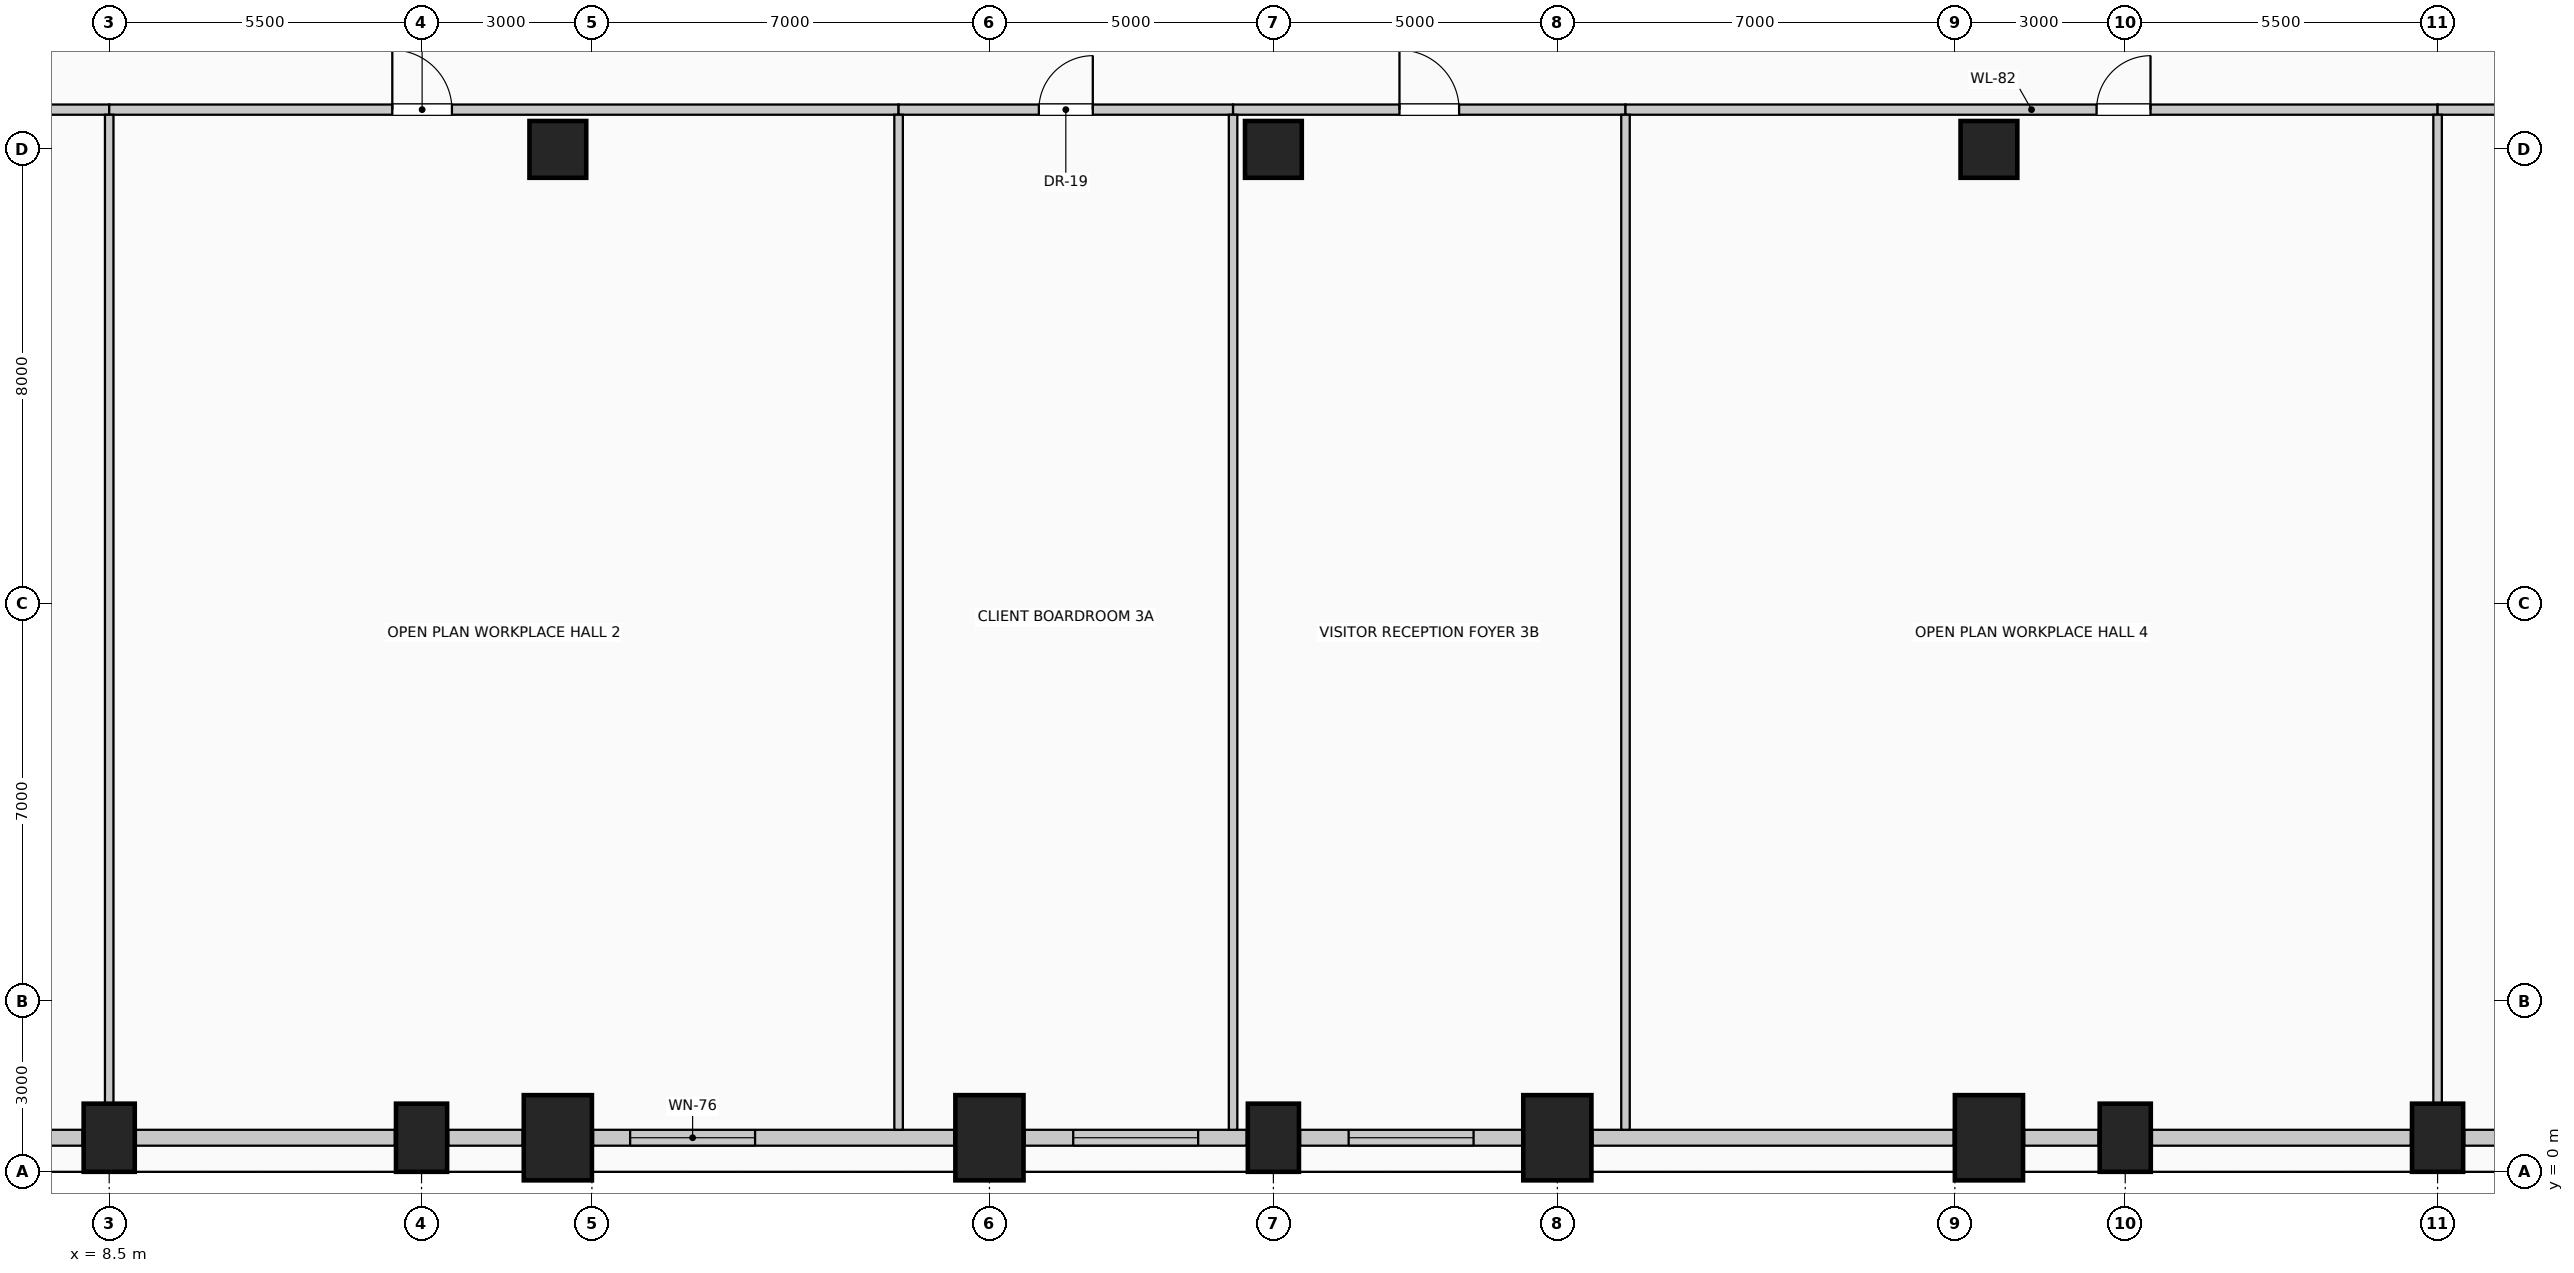
"""IFC4 building model, lengths in metres.
Left out: names, types, materials, properties, quantities, classifications, styles, units other than length and angle.
Written with IfcOpenShell. Run it as: python <this file> out.ifc"""

import sys

from ifc_helpers import new_model, si_unit, direction, frame, frame_2d, origin, origin_2d, place, context, subcontext, project, spatial, rectangle, circle, extrude, element, fill, save


model = new_model("IFC4")
c1 = context("Model", 3, precision=1e-05, world=origin(), true_north=direction((0.0, 1.0)))
c2 = subcontext(c1, "Body", "Model", "MODEL_VIEW")
j1 = project(units=[si_unit("LENGTHUNIT", "METRE"), si_unit("PLANEANGLEUNIT", "RADIAN")], contexts=[c1])
p1 = place(None, origin())
s1 = spatial("IfcSite", under=j1, at=p1, CompositionType="ELEMENT")
p2 = place(p1, origin())
s2 = spatial("IfcBuilding", under=s1, at=p2, CompositionType="ELEMENT")
p3 = place(p2, frame((0.0, 0.0, 66.6)))
s3 = spatial("IfcBuildingStorey", under=s2, at=p3, CompositionType="ELEMENT", Elevation=66.6)
for number, where, z_axis, x_axis in (
    (1, (8.5, 0.6, 0.0), (0.0, 0.0, 1.0), (1.0, 0.0, 0.0)),
    (2, (14.0, 0.6, 0.0), (0.0, 0.0, 1.0), (1.0, 0.0, 0.0)),
):
    element("IfcColumn", number, at=place(p3, frame(where, z_axis=z_axis, x_axis=x_axis)), inside=s3, PredefinedType="COLUMN", context=c2, shape_type="SweptSolid", body=[
        extrude(rectangle(XDim=0.9, YDim=1.2, at=origin_2d()), origin(), (0.0, 0.0, 1.0), 4.0),
    ])
for number, where, z_axis, x_axis in (
    (3, (16.4, 0.6, 0.0), (0.0, 0.0, 1.0), (1.0, 0.0, 0.0)),
    (4, (24.0, 0.6, 0.0), (0.0, 0.0, 1.0), (1.0, 0.0, 0.0)),
):
    element("IfcColumn", number, at=place(p3, frame(where, z_axis=z_axis, x_axis=x_axis)), inside=s3, PredefinedType="COLUMN", context=c2, shape_type="SweptSolid", body=[
        extrude(rectangle(XDim=1.2, YDim=1.5, at=origin_2d()), origin(), (0.0, 0.0, 1.0), 4.0),
    ])
p4 = place(p3, frame((29.0, 0.6, 0.0), z_axis=(0.0, 0.0, 1.0), x_axis=(1.0, 0.0, 0.0)))
e5 = element("IfcColumn", 5, at=p4, inside=s3, PredefinedType="COLUMN", context=c2, shape_type="SweptSolid", body=[
    extrude(rectangle(XDim=0.9, YDim=1.2, at=origin_2d()), origin(), (0.0, 0.0, 1.0), 4.0),
])
for number, where, z_axis, x_axis in (
    (6, (34.0, 0.6, 0.0), (0.0, 0.0, 1.0), (1.0, 0.0, 0.0)),
    (7, (41.6, 0.6, 0.0), (0.0, 0.0, 1.0), (1.0, 0.0, 0.0)),
):
    element("IfcColumn", number, at=place(p3, frame(where, z_axis=z_axis, x_axis=x_axis)), inside=s3, PredefinedType="COLUMN", context=c2, shape_type="SweptSolid", body=[
        extrude(rectangle(XDim=1.2, YDim=1.5, at=origin_2d()), origin(), (0.0, 0.0, 1.0), 4.0),
    ])
for number, where, z_axis, x_axis in (
    (8, (44.0, 0.6, 0.0), (0.0, 0.0, 1.0), (1.0, 0.0, 0.0)),
    (9, (49.5, 0.6, 0.0), (0.0, 0.0, 1.0), (1.0, 0.0, 0.0)),
):
    element("IfcColumn", number, at=place(p3, frame(where, z_axis=z_axis, x_axis=x_axis)), inside=s3, PredefinedType="COLUMN", context=c2, shape_type="SweptSolid", body=[
        extrude(rectangle(XDim=0.9, YDim=1.2, at=origin_2d()), origin(), (0.0, 0.0, 1.0), 4.0),
    ])
for number, where, z_axis, x_axis in (
    (10, (16.4, 18.0, 0.0), (0.0, 0.0, 1.0), (1.0, 0.0, 0.0)),
    (11, (29.0, 18.0, 0.0), (0.0, 0.0, 1.0), (1.0, 0.0, 0.0)),
    (12, (41.6, 18.0, 0.0), (0.0, 0.0, 1.0), (1.0, 0.0, 0.0)),
):
    element("IfcColumn", number, at=place(p3, frame(where, z_axis=z_axis, x_axis=x_axis)), inside=s3, PredefinedType="COLUMN", context=c2, shape_type="SweptSolid", body=[
        extrude(circle(Radius=0.5, at=origin_2d()), origin(), (0.0, 0.0, 1.0), 4.0),
    ])
p5 = place(p3, frame((8.03, 0.6, 0.0), z_axis=(0.0, 0.0, 1.0), x_axis=(-1.0, 0.0, 0.0)))
e13 = element("IfcWall", 13, at=p5, inside=s3, PredefinedType="SOLIDWALL", context=c2, shape_type="SweptSolid", body=[
    extrude(rectangle(XDim=3.96, YDim=0.28, at=frame_2d((1.98, 0.0))), origin(), (0.0, 0.0, 1.0), 2.85),
])
p6 = place(p3, frame((13.53, 0.6, 0.0), z_axis=(0.0, 0.0, 1.0), x_axis=(-1.0, 0.0, 0.0)))
e14 = element("IfcWall", 14, at=p6, inside=s3, PredefinedType="SOLIDWALL", context=c2, shape_type="SweptSolid", body=[
    extrude(rectangle(XDim=4.56, YDim=0.28, at=frame_2d((2.28, 0.0))), origin(), (0.0, 0.0, 1.0), 2.85),
])
p7 = place(p3, frame((15.78, 0.6, 0.0), z_axis=(0.0, 0.0, 1.0), x_axis=(-1.0, 0.0, 0.0)))
e15 = element("IfcWall", 15, at=p7, inside=s3, PredefinedType="SOLIDWALL", context=c2, shape_type="SweptSolid", body=[
    extrude(rectangle(XDim=1.31, YDim=0.28, at=frame_2d((0.655, 0.0))), origin(), (0.0, 0.0, 1.0), 2.85),
])
p8 = place(p3, frame((23.38, 0.6, 0.0), z_axis=(0.0, 0.0, 1.0), x_axis=(-1.0, 0.0, 0.0)))
e16 = element("IfcWall", 16, at=p8, inside=s3, PredefinedType="SOLIDWALL", context=c2, shape_type="SweptSolid", body=[
    extrude(rectangle(XDim=6.36, YDim=0.28, at=frame_2d((3.18, 0.0))), origin(), (0.0, 0.0, 1.0), 2.85),
])
p9 = place(p8, frame((3.507, 0.0, 0.5)))
e17 = element("IfcOpeningElement", 17, at=p9, cuts=e16, PredefinedType="OPENING", context=c2, shape_type="SweptSolid", body=[
    extrude(rectangle(XDim=2.2, YDim=1.95, at=frame_2d((1.1, 0.975))), frame((0.0, 0.15, 0.0), z_axis=(0.0, -1.0, 0.0), x_axis=(1.0, 0.0, 0.0)), (0.0, 0.0, 1.0), 0.3),
])
p10 = place(p3, frame((28.53, 0.6, 0.0), z_axis=(0.0, 0.0, 1.0), x_axis=(-1.0, 0.0, 0.0)))
e18 = element("IfcWall", 18, at=p10, inside=s3, PredefinedType="SOLIDWALL", context=c2, shape_type="SweptSolid", body=[
    extrude(rectangle(XDim=3.91, YDim=0.28, at=frame_2d((1.955, 0.0))), origin(), (0.0, 0.0, 1.0), 2.85),
])
p11 = place(p10, frame((0.855, 0.0, 0.5)))
e19 = element("IfcOpeningElement", 19, at=p11, cuts=e18, PredefinedType="OPENING", context=c2, shape_type="SweptSolid", body=[
    extrude(rectangle(XDim=2.2, YDim=1.95, at=frame_2d((1.1, 0.975))), frame((0.0, 0.15, 0.0), z_axis=(0.0, -1.0, 0.0), x_axis=(1.0, 0.0, 0.0)), (0.0, 0.0, 1.0), 0.3),
])
p12 = place(p3, frame((33.38, 0.6, 0.0), z_axis=(0.0, 0.0, 1.0), x_axis=(-1.0, 0.0, 0.0)))
e20 = element("IfcWall", 20, at=p12, inside=s3, PredefinedType="SOLIDWALL", context=c2, shape_type="SweptSolid", body=[
    extrude(rectangle(XDim=3.91, YDim=0.28, at=frame_2d((1.955, 0.0))), origin(), (0.0, 0.0, 1.0), 2.85),
])
p13 = place(p12, frame((0.855, 0.0, 0.5)))
e21 = element("IfcOpeningElement", 21, at=p13, cuts=e20, PredefinedType="OPENING", context=c2, shape_type="SweptSolid", body=[
    extrude(rectangle(XDim=2.2, YDim=1.95, at=frame_2d((1.1, 0.975))), frame((0.0, 0.15, 0.0), z_axis=(0.0, -1.0, 0.0), x_axis=(1.0, 0.0, 0.0)), (0.0, 0.0, 1.0), 0.3),
])
p14 = place(p3, frame((40.98, 0.6, 0.0), z_axis=(0.0, 0.0, 1.0), x_axis=(-1.0, 0.0, 0.0)))
e22 = element("IfcWall", 22, at=p14, inside=s3, PredefinedType="SOLIDWALL", context=c2, shape_type="SweptSolid", body=[
    extrude(rectangle(XDim=6.36, YDim=0.28, at=frame_2d((3.18, 0.0))), origin(), (0.0, 0.0, 1.0), 2.85),
])
p15 = place(p3, frame((43.53, 0.6, 0.0), z_axis=(0.0, 0.0, 1.0), x_axis=(-1.0, 0.0, 0.0)))
e23 = element("IfcWall", 23, at=p15, inside=s3, PredefinedType="SOLIDWALL", context=c2, shape_type="SweptSolid", body=[
    extrude(rectangle(XDim=1.31, YDim=0.28, at=frame_2d((0.655, 0.0))), origin(), (0.0, 0.0, 1.0), 2.85),
])
p16 = place(p3, frame((49.03, 0.6, 0.0), z_axis=(0.0, 0.0, 1.0), x_axis=(-1.0, 0.0, 0.0)))
e24 = element("IfcWall", 24, at=p16, inside=s3, PredefinedType="SOLIDWALL", context=c2, shape_type="SweptSolid", body=[
    extrude(rectangle(XDim=4.56, YDim=0.28, at=frame_2d((2.28, 0.0))), origin(), (0.0, 0.0, 1.0), 2.85),
])
p17 = place(p3, frame((53.93, 0.6, 0.0), z_axis=(0.0, 0.0, 1.0), x_axis=(-1.0, 0.0, 0.0)))
e25 = element("IfcWall", 25, at=p17, inside=s3, PredefinedType="SOLIDWALL", context=c2, shape_type="SweptSolid", body=[
    extrude(rectangle(XDim=3.96, YDim=0.28, at=frame_2d((1.98, 0.0))), origin(), (0.0, 0.0, 1.0), 2.85),
])
p18 = place(p3, frame((0.74, 18.7, 0.0), z_axis=(0.0, 0.0, 1.0), x_axis=(1.0, 0.0, 0.0)))
e26 = element("IfcWall", 26, at=p18, inside=s3, PredefinedType="PARTITIONING", context=c2, shape_type="SweptSolid", body=[
    extrude(rectangle(XDim=7.76, YDim=0.18, at=frame_2d((3.88, 0.0))), origin(), (0.0, 0.0, 1.0), 3.7),
])
p19 = place(p18, frame((3.405, 0.0, 0.0)))
e27 = element("IfcOpeningElement", 27, at=p19, cuts=e26, PredefinedType="OPENING", context=c2, shape_type="SweptSolid", body=[
    extrude(rectangle(XDim=0.95, YDim=2.15, at=frame_2d((0.475, 1.075))), frame((0.0, 0.1, 0.0), z_axis=(0.0, -1.0, 0.0), x_axis=(1.0, 0.0, 0.0)), (0.0, 0.0, 1.0), 0.2),
])
p20 = place(p3, frame((8.5, 18.7, 0.0), z_axis=(0.0, 0.0, 1.0), x_axis=(1.0, 0.0, 0.0)))
e28 = element("IfcWall", 28, at=p20, inside=s3, PredefinedType="PARTITIONING", context=c2, shape_type="SweptSolid", body=[
    extrude(rectangle(XDim=13.9, YDim=0.18, at=frame_2d((6.95, 0.0))), origin(), (0.0, 0.0, 1.0), 3.7),
])
p21 = place(p20, frame((4.985, 0.0, 0.0)))
e29 = element("IfcOpeningElement", 29, at=p21, cuts=e28, PredefinedType="OPENING", context=c2, shape_type="SweptSolid", body=[
    extrude(rectangle(XDim=1.05, YDim=2.15, at=frame_2d((0.525, 1.075))), frame((0.0, 0.1, 0.0), z_axis=(0.0, -1.0, 0.0), x_axis=(1.0, 0.0, 0.0)), (0.0, 0.0, 1.0), 0.2),
])
p22 = place(p3, frame((22.4, 18.7, 0.0), z_axis=(0.0, 0.0, 1.0), x_axis=(1.0, 0.0, 0.0)))
e30 = element("IfcWall", 30, at=p22, inside=s3, PredefinedType="PARTITIONING", context=c2, shape_type="SweptSolid", body=[
    extrude(rectangle(XDim=5.89, YDim=0.18, at=frame_2d((2.945, 0.0))), origin(), (0.0, 0.0, 1.0), 3.7),
])
p23 = place(p22, frame((2.47, 0.0, 0.0)))
e31 = element("IfcOpeningElement", 31, at=p23, cuts=e30, PredefinedType="OPENING", context=c2, shape_type="SweptSolid", body=[
    extrude(rectangle(XDim=0.95, YDim=2.15, at=frame_2d((0.475, 1.075))), frame((0.0, 0.1, 0.0), z_axis=(0.0, -1.0, 0.0), x_axis=(1.0, 0.0, 0.0)), (0.0, 0.0, 1.0), 0.2),
])
p24 = place(p3, frame((28.29, 18.7, 0.0), z_axis=(0.0, 0.0, 1.0), x_axis=(1.0, 0.0, 0.0)))
e32 = element("IfcWall", 32, at=p24, inside=s3, PredefinedType="PARTITIONING", context=c2, shape_type="SweptSolid", body=[
    extrude(rectangle(XDim=6.91, YDim=0.18, at=frame_2d((3.455, 0.0))), origin(), (0.0, 0.0, 1.0), 3.7),
])
p25 = place(p24, frame((2.93, 0.0, 0.0)))
e33 = element("IfcOpeningElement", 33, at=p25, cuts=e32, PredefinedType="OPENING", context=c2, shape_type="SweptSolid", body=[
    extrude(rectangle(XDim=1.05, YDim=2.15, at=frame_2d((0.525, 1.075))), frame((0.0, 0.1, 0.0), z_axis=(0.0, -1.0, 0.0), x_axis=(1.0, 0.0, 0.0)), (0.0, 0.0, 1.0), 0.2),
])
p26 = place(p3, frame((35.2, 18.7, 0.0), z_axis=(0.0, 0.0, 1.0), x_axis=(1.0, 0.0, 0.0)))
e34 = element("IfcWall", 34, at=p26, inside=s3, PredefinedType="PARTITIONING", context=c2, shape_type="SweptSolid", body=[
    extrude(rectangle(XDim=14.3, YDim=0.18, at=frame_2d((7.15, 0.0))), origin(), (0.0, 0.0, 1.0), 3.7),
])
p27 = place(p26, frame((8.295, 0.0, 0.0)))
e35 = element("IfcOpeningElement", 35, at=p27, cuts=e34, PredefinedType="OPENING", context=c2, shape_type="SweptSolid", body=[
    extrude(rectangle(XDim=0.95, YDim=2.15, at=frame_2d((0.475, 1.075))), frame((0.0, 0.1, 0.0), z_axis=(0.0, -1.0, 0.0), x_axis=(1.0, 0.0, 0.0)), (0.0, 0.0, 1.0), 0.2),
])
p28 = place(p3, frame((49.5, 18.7, 0.0), z_axis=(0.0, 0.0, 1.0), x_axis=(1.0, 0.0, 0.0)))
e36 = element("IfcWall", 36, at=p28, inside=s3, PredefinedType="PARTITIONING", context=c2, shape_type="SweptSolid", body=[
    extrude(rectangle(XDim=7.76, YDim=0.18, at=frame_2d((3.88, 0.0))), origin(), (0.0, 0.0, 1.0), 3.7),
])
p29 = place(p28, frame((3.355, 0.0, 0.0)))
e37 = element("IfcOpeningElement", 37, at=p29, cuts=e36, PredefinedType="OPENING", context=c2, shape_type="SweptSolid", body=[
    extrude(rectangle(XDim=1.05, YDim=2.15, at=frame_2d((0.525, 1.075))), frame((0.0, 0.1, 0.0), z_axis=(0.0, -1.0, 0.0), x_axis=(1.0, 0.0, 0.0)), (0.0, 0.0, 1.0), 0.2),
])
p30 = place(p3, frame((8.5, 1.2, 0.0), z_axis=(0.0, 0.0, 1.0), x_axis=(0.0, 1.0, 0.0)))
e38 = element("IfcWall", 38, at=p30, inside=s3, PredefinedType="PARTITIONING", context=c2, shape_type="SweptSolid", body=[
    extrude(rectangle(XDim=17.41, YDim=0.15, at=frame_2d((8.705, 0.0))), origin(), (0.0, 0.0, 1.0), 3.7),
])
for number, where, z_axis, x_axis in (
    (39, (22.4, 0.74, 0.0), (0.0, 0.0, 1.0), (0.0, 1.0, 0.0)),
    (40, (28.29, 0.74, 0.0), (0.0, 0.0, 1.0), (0.0, 1.0, 0.0)),
    (41, (35.2, 0.74, 0.0), (0.0, 0.0, 1.0), (0.0, 1.0, 0.0)),
):
    element("IfcWall", number, at=place(p3, frame(where, z_axis=z_axis, x_axis=x_axis)), inside=s3, PredefinedType="PARTITIONING", context=c2, shape_type="SweptSolid", body=[
        extrude(rectangle(XDim=17.87, YDim=0.15, at=frame_2d((8.935, 0.0))), origin(), (0.0, 0.0, 1.0), 3.7),
    ])
p31 = place(p3, frame((49.5, 1.2, 0.0), z_axis=(0.0, 0.0, 1.0), x_axis=(0.0, 1.0, 0.0)))
e42 = element("IfcWall", 42, at=p31, inside=s3, PredefinedType="PARTITIONING", context=c2, shape_type="SweptSolid", body=[
    extrude(rectangle(XDim=17.41, YDim=0.15, at=frame_2d((8.705, 0.0))), origin(), (0.0, 0.0, 1.0), 3.7),
])
p32 = place(p9, origin())
e43 = element("IfcWindow", 43, at=p32, inside=s3, PartitioningType="SINGLE_PANEL", PredefinedType="WINDOW", context=c2, shape_type="SweptSolid", body=[
    extrude(rectangle(XDim=2.2, YDim=1.95, at=frame_2d((1.1, 0.975))), frame((0.0, 0.03, 0.0), z_axis=(0.0, -1.0, 0.0), x_axis=(1.0, 0.0, 0.0)), (0.0, 0.0, 1.0), 0.06),
])
fill(e17, e43)
p33 = place(p11, origin())
e44 = element("IfcWindow", 44, at=p33, inside=s3, PartitioningType="SINGLE_PANEL", PredefinedType="WINDOW", context=c2, shape_type="SweptSolid", body=[
    extrude(rectangle(XDim=2.2, YDim=1.95, at=frame_2d((1.1, 0.975))), frame((0.0, 0.03, 0.0), z_axis=(0.0, -1.0, 0.0), x_axis=(1.0, 0.0, 0.0)), (0.0, 0.0, 1.0), 0.06),
])
fill(e19, e44)
p34 = place(p13, origin())
e45 = element("IfcWindow", 45, at=p34, inside=s3, PartitioningType="SINGLE_PANEL", PredefinedType="WINDOW", context=c2, shape_type="SweptSolid", body=[
    extrude(rectangle(XDim=2.2, YDim=1.95, at=frame_2d((1.1, 0.975))), frame((0.0, 0.03, 0.0), z_axis=(0.0, -1.0, 0.0), x_axis=(1.0, 0.0, 0.0)), (0.0, 0.0, 1.0), 0.06),
])
fill(e21, e45)
p35 = place(p21, origin())
e46 = element("IfcDoor", 46, at=p35, inside=s3, OperationType="SINGLE_SWING_LEFT", PredefinedType="DOOR", context=c2, shape_type="SweptSolid", body=[
    extrude(rectangle(XDim=1.05, YDim=2.15, at=frame_2d((0.525, 1.075))), frame((0.0, 0.025, 0.0), z_axis=(0.0, -1.0, 0.0), x_axis=(1.0, 0.0, 0.0)), (0.0, 0.0, 1.0), 0.05),
])
fill(e29, e46)
p36 = place(p23, origin())
e47 = element("IfcDoor", 47, at=p36, inside=s3, OperationType="SINGLE_SWING_RIGHT", PredefinedType="DOOR", context=c2, shape_type="SweptSolid", body=[
    extrude(rectangle(XDim=0.95, YDim=2.15, at=frame_2d((0.475, 1.075))), frame((0.0, 0.025, 0.0), z_axis=(0.0, -1.0, 0.0), x_axis=(1.0, 0.0, 0.0)), (0.0, 0.0, 1.0), 0.05),
])
fill(e31, e47)
p37 = place(p25, origin())
e48 = element("IfcDoor", 48, at=p37, inside=s3, OperationType="SINGLE_SWING_LEFT", PredefinedType="DOOR", context=c2, shape_type="SweptSolid", body=[
    extrude(rectangle(XDim=1.05, YDim=2.15, at=frame_2d((0.525, 1.075))), frame((0.0, 0.025, 0.0), z_axis=(0.0, -1.0, 0.0), x_axis=(1.0, 0.0, 0.0)), (0.0, 0.0, 1.0), 0.05),
])
fill(e33, e48)
p38 = place(p27, origin())
e49 = element("IfcDoor", 49, at=p38, inside=s3, OperationType="SINGLE_SWING_RIGHT", PredefinedType="DOOR", context=c2, shape_type="SweptSolid", body=[
    extrude(rectangle(XDim=0.95, YDim=2.15, at=frame_2d((0.475, 1.075))), frame((0.0, 0.025, 0.0), z_axis=(0.0, -1.0, 0.0), x_axis=(1.0, 0.0, 0.0)), (0.0, 0.0, 1.0), 0.05),
])
fill(e35, e49)
save(model, sys.argv[1])
